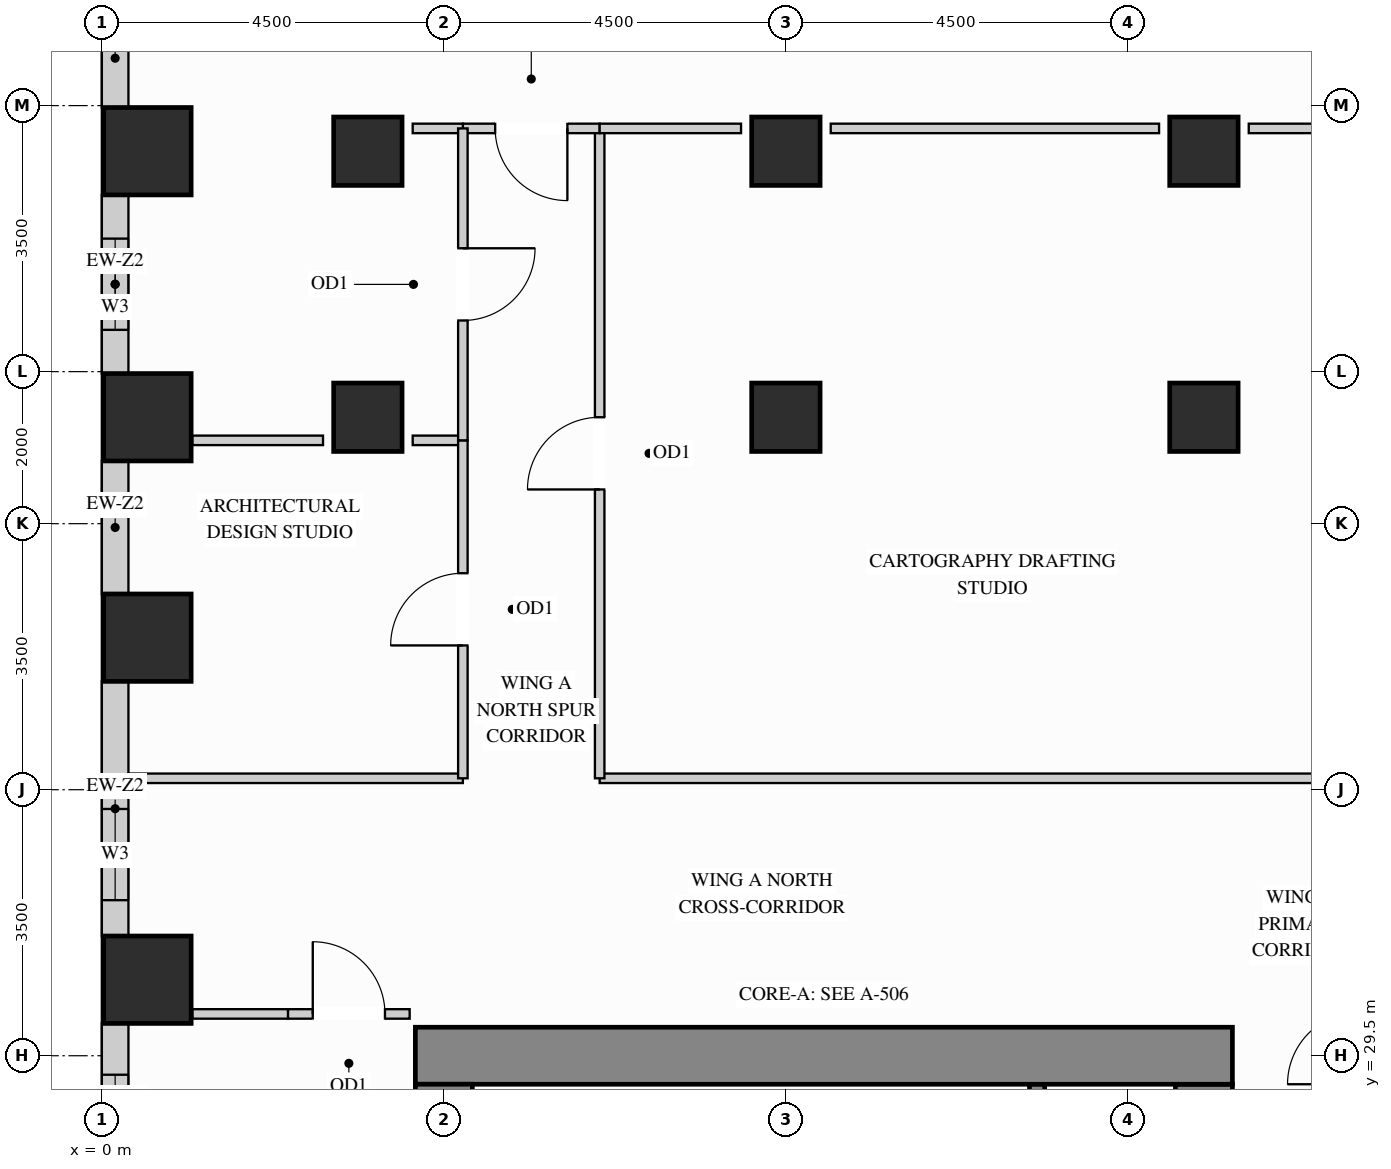
"""IFC4 building model, lengths in metres.
Left out: names, types, materials, properties, quantities, classifications, styles, units other than length and angle.
Written with IfcOpenShell. Run it as: python <this file> out.ifc"""

import sys

from ifc_helpers import new_model, si_unit, direction, frame, frame_2d, origin, origin_2d, place, context, subcontext, project, spatial, rectangle, extrude, source, transform, mapped, element, fill, save


model = new_model("IFC4")
c1 = context("Model", 3, precision=1e-05, world=origin(), true_north=direction((0.0, 1.0)))
c2 = subcontext(c1, "Body", "Model", "MODEL_VIEW")
j1 = project(units=[si_unit("LENGTHUNIT", "METRE"), si_unit("PLANEANGLEUNIT", "RADIAN")], contexts=[c1])
p1 = place(None, origin())
s1 = spatial("IfcSite", under=j1, at=p1, CompositionType="ELEMENT")
p2 = place(p1, origin())
s2 = spatial("IfcBuilding", under=s1, at=p2, CompositionType="ELEMENT")
p3 = place(p2, frame((0.0, 0.0, 84.6)))
s3 = spatial("IfcBuildingStorey", under=s2, at=p3, CompositionType="ELEMENT", Elevation=84.6)
m1 = source(origin(), c2, "Body", "SweptSolid", [
    extrude(rectangle(XDim=0.9, YDim=0.9, at=origin_2d()), origin(), (0.0, 0.0, 1.0), 3.38),
])
for number, where, z_axis, x_axis in (
    (1, (14.5, 37.9, 0.0), (0.0, 0.0, 1.0), (1.0, 0.0, 0.0)),
    (2, (14.5, 41.4, 0.0), (0.0, 0.0, 1.0), (1.0, 0.0, 0.0)),
    (3, (3.5, 37.9, 0.0), (0.0, 0.0, 1.0), (1.0, 0.0, 0.0)),
    (4, (3.5, 41.4, 0.0), (0.0, 0.0, 1.0), (1.0, 0.0, 0.0)),
    (5, (9.0, 37.9, 0.0), (0.0, 0.0, 1.0), (1.0, 0.0, 0.0)),
    (6, (9.0, 41.4, 0.0), (0.0, 0.0, 1.0), (1.0, 0.0, 0.0)),
):
    element("IfcColumn", number, at=place(p3, frame(where, z_axis=z_axis, x_axis=x_axis)), inside=s3, PredefinedType="COLUMN", context=c2, shape_type="MappedRepresentation", body=[
        mapped(m1, transform((0.0, 0.0, 0.0), x_axis=(1.0, 0.0, 0.0), y_axis=(0.0, 1.0, 0.0), z_axis=(0.0, 0.0, 1.0))),
    ])
m2 = source(origin(), c2, "Body", "SweptSolid", [
    extrude(rectangle(XDim=1.15, YDim=1.15, at=origin_2d()), origin(), (0.0, 0.0, 1.0), 3.38),
])
for number, where, z_axis, x_axis in (
    (7, (0.6, 30.5, 0.0), (0.0, 0.0, 1.0), (1.0, 0.0, 0.0)),
    (8, (0.6, 35.0, 0.0), (0.0, 0.0, 1.0), (1.0, 0.0, 0.0)),
    (9, (0.6, 37.9, 0.0), (0.0, 0.0, 1.0), (1.0, 0.0, 0.0)),
    (10, (0.6, 41.4, 0.0), (0.0, 0.0, 1.0), (1.0, 0.0, 0.0)),
):
    element("IfcColumn", number, at=place(p3, frame(where, z_axis=z_axis, x_axis=x_axis)), inside=s3, PredefinedType="COLUMN", context=c2, shape_type="MappedRepresentation", body=[
        mapped(m2, transform((0.0, 0.0, 0.0), x_axis=(1.0, 0.0, 0.0), y_axis=(0.0, 1.0, 0.0), z_axis=(0.0, 0.0, 1.0))),
    ])
m3 = source(origin(), c2, "Body", "SweptSolid", [
    extrude(rectangle(XDim=8.245, YDim=0.75, at=frame_2d((4.123, 0.0))), origin(), (0.0, 0.0, 1.0), 3.38),
])
p4 = place(p3, frame((14.5, 20.88, 0.0), z_axis=(0.0, 0.0, 1.0), x_axis=(0.0, 1.0, 0.0)))
e11 = element("IfcWall", 11, at=p4, inside=s3, PredefinedType="SHEAR", context=c2, shape_type="MappedRepresentation", body=[
    mapped(m3, transform((0.0, 0.0, 0.0), x_axis=(1.0, 0.0, 0.0), y_axis=(0.0, 1.0, 0.0), z_axis=(0.0, 0.0, 1.0))),
])
m4 = source(origin(), c2, "Body", "SweptSolid", [
    extrude(rectangle(XDim=10.75, YDim=0.75, at=frame_2d((5.375, 0.0))), origin(), (0.0, 0.0, 1.0), 3.38),
])
p5 = place(p3, frame((4.125, 29.5, 0.0), z_axis=(0.0, 0.0, 1.0), x_axis=(1.0, 0.0, 0.0)))
e12 = element("IfcWall", 12, at=p5, inside=s3, PredefinedType="SHEAR", context=c2, shape_type="MappedRepresentation", body=[
    mapped(m4, transform((0.0, 0.0, 0.0), x_axis=(1.0, 0.0, 0.0), y_axis=(0.0, 1.0, 0.0), z_axis=(0.0, 0.0, 1.0))),
])
m5 = source(origin(), c2, "Body", "SweptSolid", [
    extrude(rectangle(XDim=20.25, YDim=0.75, at=frame_2d((10.125, 0.0))), origin(), (0.0, 0.0, 1.0), 3.38),
])
p6 = place(p3, frame((4.5, 8.875, 0.0), z_axis=(0.0, 0.0, 1.0), x_axis=(0.0, 1.0, 0.0)))
e13 = element("IfcWall", 13, at=p6, inside=s3, PredefinedType="SHEAR", context=c2, shape_type="MappedRepresentation", body=[
    mapped(m5, transform((0.0, 0.0, 0.0), x_axis=(1.0, 0.0, 0.0), y_axis=(0.0, 1.0, 0.0), z_axis=(0.0, 0.0, 1.0))),
])
m6 = source(origin(), c2, "Body", "SweptSolid", [
    extrude(rectangle(XDim=1.179, YDim=0.35, at=frame_2d((0.59, 0.0))), origin(), (0.0, 0.0, 1.0), 3.365),
])
p7 = place(p3, frame((0.175, 43.152, 0.0), z_axis=(0.0, 0.0, 1.0), x_axis=(0.0, -1.0, 0.0)))
e14 = element("IfcWall", 14, at=p7, inside=s3, PredefinedType="SOLIDWALL", context=c2, shape_type="MappedRepresentation", body=[
    mapped(m6, transform((0.0, 0.0, 0.0), x_axis=(1.0, 0.0, 0.0), y_axis=(0.0, 1.0, 0.0), z_axis=(0.0, 0.0, 1.0))),
])
p8 = place(p3, frame((0.175, 40.827, 0.0), z_axis=(0.0, 0.0, 1.0), x_axis=(0.0, -1.0, 0.0)))
e15 = element("IfcWall", 15, at=p8, inside=s3, PredefinedType="SOLIDWALL", context=c2, shape_type="SweptSolid", body=[
    extrude(rectangle(XDim=2.354, YDim=0.35, at=frame_2d((1.177, 0.0))), origin(), (0.0, 0.0, 1.0), 3.365),
])
p9 = place(p8, frame((0.577, 0.0, 0.78)))
e16 = element("IfcOpeningElement", 16, at=p9, cuts=e15, PredefinedType="OPENING", context=c2, shape_type="SweptSolid", body=[
    extrude(rectangle(XDim=1.2, YDim=2.1, at=frame_2d((0.6, 1.05))), frame((0.0, 0.185, 0.0), z_axis=(0.0, -1.0, 0.0), x_axis=(1.0, 0.0, 0.0)), (0.0, 0.0, 1.0), 0.37),
])
m7 = source(origin(), c2, "Body", "SweptSolid", [
    extrude(rectangle(XDim=1.754, YDim=0.35, at=frame_2d((0.877, 0.0))), origin(), (0.0, 0.0, 1.0), 3.365),
])
p10 = place(p3, frame((0.175, 37.327, 0.0), z_axis=(0.0, 0.0, 1.0), x_axis=(0.0, -1.0, 0.0)))
e17 = element("IfcWall", 17, at=p10, inside=s3, PredefinedType="SOLIDWALL", context=c2, shape_type="MappedRepresentation", body=[
    mapped(m7, transform((0.0, 0.0, 0.0), x_axis=(1.0, 0.0, 0.0), y_axis=(0.0, 1.0, 0.0), z_axis=(0.0, 0.0, 1.0))),
])
p11 = place(p3, frame((0.175, 34.427, 0.0), z_axis=(0.0, 0.0, 1.0), x_axis=(0.0, -1.0, 0.0)))
e18 = element("IfcWall", 18, at=p11, inside=s3, PredefinedType="SOLIDWALL", context=c2, shape_type="SweptSolid", body=[
    extrude(rectangle(XDim=3.354, YDim=0.35, at=frame_2d((1.677, 0.0))), origin(), (0.0, 0.0, 1.0), 3.365),
])
p12 = place(p11, frame((1.68, 0.0, 0.78)))
e19 = element("IfcOpeningElement", 19, at=p12, cuts=e18, PredefinedType="OPENING", context=c2, shape_type="SweptSolid", body=[
    extrude(rectangle(XDim=1.2, YDim=2.1, at=frame_2d((0.6, 1.05))), frame((0.0, 0.185, 0.0), z_axis=(0.0, -1.0, 0.0), x_axis=(1.0, 0.0, 0.0)), (0.0, 0.0, 1.0), 0.37),
])
p13 = place(p3, frame((0.175, 29.927, 0.0), z_axis=(0.0, 0.0, 1.0), x_axis=(0.0, -1.0, 0.0)))
e20 = element("IfcWall", 20, at=p13, inside=s3, PredefinedType="SOLIDWALL", context=c2, shape_type="SweptSolid", body=[
    extrude(rectangle(XDim=2.554, YDim=0.35, at=frame_2d((1.277, 0.0))), origin(), (0.0, 0.0, 1.0), 3.365),
])
p14 = place(p13, frame((0.677, 0.0, 0.78)))
e21 = element("IfcOpeningElement", 21, at=p14, cuts=e20, PredefinedType="OPENING", context=c2, shape_type="SweptSolid", body=[
    extrude(rectangle(XDim=1.2, YDim=2.1, at=frame_2d((0.6, 1.05))), frame((0.0, 0.185, 0.0), z_axis=(0.0, -1.0, 0.0), x_axis=(1.0, 0.0, 0.0)), (0.0, 0.0, 1.0), 0.37),
])
m8 = source(origin(), c2, "Body", "SweptSolid", [
    extrude(rectangle(XDim=12.598, YDim=0.125, at=frame_2d((6.299, 0.0))), origin(), (0.0, 0.0, 1.0), 3.365),
])
p15 = place(p3, frame((6.55, 33.15, 0.0), z_axis=(0.0, 0.0, 1.0), x_axis=(1.0, 0.0, 0.0)))
e22 = element("IfcWall", 22, at=p15, inside=s3, PredefinedType="PARTITIONING", context=c2, shape_type="MappedRepresentation", body=[
    mapped(m8, transform((0.0, 0.0, 0.0), x_axis=(1.0, 0.0, 0.0), y_axis=(0.0, 1.0, 0.0), z_axis=(0.0, 0.0, 1.0))),
])
m9 = source(origin(), c2, "Body", "SweptSolid", [
    extrude(rectangle(XDim=4.398, YDim=0.125, at=frame_2d((2.199, 0.0))), origin(), (0.0, 0.0, 1.0), 3.365),
])
p16 = place(p3, frame((0.352, 33.15, 0.0), z_axis=(0.0, 0.0, 1.0), x_axis=(1.0, 0.0, 0.0)))
e23 = element("IfcWall", 23, at=p16, inside=s3, PredefinedType="PARTITIONING", context=c2, shape_type="MappedRepresentation", body=[
    mapped(m9, transform((0.0, 0.0, 0.0), x_axis=(1.0, 0.0, 0.0), y_axis=(0.0, 1.0, 0.0), z_axis=(0.0, 0.0, 1.0))),
])
m10 = source(origin(), c2, "Body", "SweptSolid", [
    extrude(rectangle(XDim=1.72, YDim=0.125, at=frame_2d((0.86, 0.0))), origin(), (0.0, 0.0, 1.0), 3.365),
])
p17 = place(p3, frame((1.19, 37.596, 0.0), z_axis=(0.0, 0.0, 1.0), x_axis=(1.0, 0.0, 0.0)))
e24 = element("IfcWall", 24, at=p17, inside=s3, PredefinedType="PARTITIONING", context=c2, shape_type="MappedRepresentation", body=[
    mapped(m10, transform((0.0, 0.0, 0.0), x_axis=(1.0, 0.0, 0.0), y_axis=(0.0, 1.0, 0.0), z_axis=(0.0, 0.0, 1.0))),
])
m11 = source(origin(), c2, "Body", "SweptSolid", [
    extrude(rectangle(XDim=0.66, YDim=0.125, at=frame_2d((0.33, 0.0))), origin(), (0.0, 0.0, 1.0), 3.365),
])
p18 = place(p3, frame((4.09, 37.596, 0.0), z_axis=(0.0, 0.0, 1.0), x_axis=(1.0, 0.0, 0.0)))
e25 = element("IfcWall", 25, at=p18, inside=s3, PredefinedType="PARTITIONING", context=c2, shape_type="MappedRepresentation", body=[
    mapped(m11, transform((0.0, 0.0, 0.0), x_axis=(1.0, 0.0, 0.0), y_axis=(0.0, 1.0, 0.0), z_axis=(0.0, 0.0, 1.0))),
])
m12 = source(origin(), c2, "Body", "SweptSolid", [
    extrude(rectangle(XDim=1.26, YDim=0.125, at=frame_2d((0.63, 0.0))), origin(), (0.0, 0.0, 1.0), 3.365),
])
p19 = place(p3, frame((1.19, 30.05, 0.0), z_axis=(0.0, 0.0, 1.0), x_axis=(1.0, 0.0, 0.0)))
e26 = element("IfcWall", 26, at=p19, inside=s3, PredefinedType="PARTITIONING", context=c2, shape_type="MappedRepresentation", body=[
    mapped(m12, transform((0.0, 0.0, 0.0), x_axis=(1.0, 0.0, 0.0), y_axis=(0.0, 1.0, 0.0), z_axis=(0.0, 0.0, 1.0))),
])
p20 = place(p3, frame((2.45, 30.05, 0.0), z_axis=(0.0, 0.0, 1.0), x_axis=(1.0, 0.0, 0.0)))
e27 = element("IfcWall", 27, at=p20, inside=s3, PredefinedType="PARTITIONING", context=c2, shape_type="SweptSolid", body=[
    extrude(rectangle(XDim=1.6, YDim=0.125, at=frame_2d((0.8, 0.0))), origin(), (0.0, 0.0, 1.0), 3.365),
])
p21 = place(p20, frame((0.325, 0.0, 0.0)))
e28 = element("IfcOpeningElement", 28, at=p21, cuts=e27, PredefinedType="OPENING", context=c2, shape_type="SweptSolid", body=[
    extrude(rectangle(XDim=0.95, YDim=2.15, at=frame_2d((0.475, 1.075))), frame((0.0, 0.073, 0.0), z_axis=(0.0, -1.0, 0.0), x_axis=(1.0, 0.0, 0.0)), (0.0, 0.0, 1.0), 0.145),
])
p22 = place(p3, frame((6.55, 33.15, 0.0), z_axis=(0.0, 0.0, 1.0), x_axis=(0.0, 1.0, 0.0)))
e29 = element("IfcWall", 29, at=p22, inside=s3, PredefinedType="PARTITIONING", context=c2, shape_type="SweptSolid", body=[
    extrude(rectangle(XDim=8.55, YDim=0.125, at=frame_2d((4.275, 0.0))), origin(), (0.0, 0.0, 1.0), 3.365),
])
p23 = place(p22, frame((3.8, 0.0, 0.0)))
e30 = element("IfcOpeningElement", 30, at=p23, cuts=e29, PredefinedType="OPENING", context=c2, shape_type="SweptSolid", body=[
    extrude(rectangle(XDim=0.95, YDim=2.15, at=frame_2d((0.475, 1.075))), frame((0.0, 0.073, 0.0), z_axis=(0.0, -1.0, 0.0), x_axis=(1.0, 0.0, 0.0)), (0.0, 0.0, 1.0), 0.145),
])
p24 = place(p3, frame((4.75, 41.7, 0.0), z_axis=(0.0, 0.0, 1.0), x_axis=(1.0, 0.0, 0.0)))
e31 = element("IfcWall", 31, at=p24, inside=s3, PredefinedType="PARTITIONING", context=c2, shape_type="SweptSolid", body=[
    extrude(rectangle(XDim=1.8, YDim=0.125, at=frame_2d((0.9, 0.0))), origin(), (0.0, 0.0, 1.0), 3.365),
])
p25 = place(p24, frame((0.425, 0.0, 0.0)))
e32 = element("IfcOpeningElement", 32, at=p25, cuts=e31, PredefinedType="OPENING", context=c2, shape_type="SweptSolid", body=[
    extrude(rectangle(XDim=0.95, YDim=2.15, at=frame_2d((0.475, 1.075))), frame((0.0, 0.073, 0.0), z_axis=(0.0, -1.0, 0.0), x_axis=(1.0, 0.0, 0.0)), (0.0, 0.0, 1.0), 0.145),
])
m13 = source(origin(), c2, "Body", "SweptSolid", [
    extrude(rectangle(XDim=1.86, YDim=0.125, at=frame_2d((0.93, 0.0))), origin(), (0.0, 0.0, 1.0), 3.365),
])
p26 = place(p3, frame((6.55, 41.7, 0.0), z_axis=(0.0, 0.0, 1.0), x_axis=(1.0, 0.0, 0.0)))
e33 = element("IfcWall", 33, at=p26, inside=s3, PredefinedType="PARTITIONING", context=c2, shape_type="MappedRepresentation", body=[
    mapped(m13, transform((0.0, 0.0, 0.0), x_axis=(1.0, 0.0, 0.0), y_axis=(0.0, 1.0, 0.0), z_axis=(0.0, 0.0, 1.0))),
])
m14 = source(origin(), c2, "Body", "SweptSolid", [
    extrude(rectangle(XDim=4.32, YDim=0.125, at=frame_2d((2.16, 0.0))), origin(), (0.0, 0.0, 1.0), 3.365),
])
p27 = place(p3, frame((9.59, 41.7, 0.0), z_axis=(0.0, 0.0, 1.0), x_axis=(1.0, 0.0, 0.0)))
e34 = element("IfcWall", 34, at=p27, inside=s3, PredefinedType="PARTITIONING", context=c2, shape_type="MappedRepresentation", body=[
    mapped(m14, transform((0.0, 0.0, 0.0), x_axis=(1.0, 0.0, 0.0), y_axis=(0.0, 1.0, 0.0), z_axis=(0.0, 0.0, 1.0))),
])
m15 = source(origin(), c2, "Body", "SweptSolid", [
    extrude(rectangle(XDim=1.81, YDim=0.125, at=frame_2d((0.905, 0.0))), origin(), (0.0, 0.0, 1.0), 3.365),
])
p28 = place(p3, frame((15.09, 41.7, 0.0), z_axis=(0.0, 0.0, 1.0), x_axis=(1.0, 0.0, 0.0)))
e35 = element("IfcWall", 35, at=p28, inside=s3, PredefinedType="PARTITIONING", context=c2, shape_type="MappedRepresentation", body=[
    mapped(m15, transform((0.0, 0.0, 0.0), x_axis=(1.0, 0.0, 0.0), y_axis=(0.0, 1.0, 0.0), z_axis=(0.0, 0.0, 1.0))),
])
p29 = place(p3, frame((4.09, 41.7, 0.0), z_axis=(0.0, 0.0, 1.0), x_axis=(1.0, 0.0, 0.0)))
e36 = element("IfcWall", 36, at=p29, inside=s3, PredefinedType="PARTITIONING", context=c2, shape_type="MappedRepresentation", body=[
    mapped(m11, transform((0.0, 0.0, 0.0), x_axis=(1.0, 0.0, 0.0), y_axis=(0.0, 1.0, 0.0), z_axis=(0.0, 0.0, 1.0))),
])
p30 = place(p3, frame((4.75, 33.15, 0.0), z_axis=(0.0, 0.0, 1.0), x_axis=(0.0, 1.0, 0.0)))
e37 = element("IfcWall", 37, at=p30, inside=s3, PredefinedType="PARTITIONING", context=c2, shape_type="SweptSolid", body=[
    extrude(rectangle(XDim=4.446, YDim=0.125, at=frame_2d((2.223, 0.0))), origin(), (0.0, 0.0, 1.0), 3.365),
])
p31 = place(p30, frame((1.748, 0.0, 0.0)))
e38 = element("IfcOpeningElement", 38, at=p31, cuts=e37, PredefinedType="OPENING", context=c2, shape_type="SweptSolid", body=[
    extrude(rectangle(XDim=0.95, YDim=2.15, at=frame_2d((0.475, 1.075))), frame((0.0, 0.073, 0.0), z_axis=(0.0, -1.0, 0.0), x_axis=(1.0, 0.0, 0.0)), (0.0, 0.0, 1.0), 0.145),
])
p32 = place(p3, frame((4.75, 37.596, 0.0), z_axis=(0.0, 0.0, 1.0), x_axis=(0.0, 1.0, 0.0)))
e39 = element("IfcWall", 39, at=p32, inside=s3, PredefinedType="PARTITIONING", context=c2, shape_type="SweptSolid", body=[
    extrude(rectangle(XDim=4.104, YDim=0.125, at=frame_2d((2.052, 0.0))), origin(), (0.0, 0.0, 1.0), 3.365),
])
p33 = place(p32, frame((1.577, 0.0, 0.0)))
e40 = element("IfcOpeningElement", 40, at=p33, cuts=e39, PredefinedType="OPENING", context=c2, shape_type="SweptSolid", body=[
    extrude(rectangle(XDim=0.95, YDim=2.15, at=frame_2d((0.475, 1.075))), frame((0.0, 0.073, 0.0), z_axis=(0.0, -1.0, 0.0), x_axis=(1.0, 0.0, 0.0)), (0.0, 0.0, 1.0), 0.145),
])
m16 = source(origin(), c2, "Body", "SweptSolid", [
    extrude(rectangle(XDim=3.678, YDim=0.2, at=frame_2d((1.839, 0.0))), origin(), (0.0, 0.0, 1.0), 3.38),
])
p34 = place(p3, frame((12.305, 25.445, 0.0), z_axis=(0.0, 0.0, 1.0), x_axis=(0.0, 1.0, 0.0)))
e41 = element("IfcWall", 41, at=p34, inside=s3, PredefinedType="SHEAR", context=c2, shape_type="MappedRepresentation", body=[
    mapped(m16, transform((0.0, 0.0, 0.0), x_axis=(1.0, 0.0, 0.0), y_axis=(0.0, 1.0, 0.0), z_axis=(0.0, 0.0, 1.0))),
])
m17 = source(origin(), c2, "Body", "SweptSolid", [
    extrude(rectangle(XDim=0.95, YDim=2.15, at=frame_2d((0.475, 1.075))), frame((0.0, 0.025, 0.0), z_axis=(0.0, -1.0, 0.0), x_axis=(1.0, 0.0, 0.0)), (0.0, 0.0, 1.0), 0.05),
])
p35 = place(p23, origin())
e42 = element("IfcDoor", 42, at=p35, inside=s3, OperationType="SINGLE_SWING_LEFT", PredefinedType="DOOR", context=c2, shape_type="MappedRepresentation", body=[
    mapped(m17, transform((0.0, 0.0, 0.0), x_axis=(1.0, 0.0, 0.0), y_axis=(0.0, 1.0, 0.0), z_axis=(0.0, 0.0, 1.0))),
])
fill(e30, e42)
p36 = place(p25, origin())
e43 = element("IfcDoor", 43, at=p36, inside=s3, OperationType="SINGLE_SWING_RIGHT", PredefinedType="DOOR", context=c2, shape_type="MappedRepresentation", body=[
    mapped(m17, transform((0.0, 0.0, 0.0), x_axis=(1.0, 0.0, 0.0), y_axis=(0.0, 1.0, 0.0), z_axis=(0.0, 0.0, 1.0))),
])
fill(e32, e43)
p37 = place(p31, origin())
e44 = element("IfcDoor", 44, at=p37, inside=s3, OperationType="SINGLE_SWING_LEFT", PredefinedType="DOOR", context=c2, shape_type="MappedRepresentation", body=[
    mapped(m17, transform((0.0, 0.0, 0.0), x_axis=(1.0, 0.0, 0.0), y_axis=(0.0, 1.0, 0.0), z_axis=(0.0, 0.0, 1.0))),
])
fill(e38, e44)
p38 = place(p33, origin())
e45 = element("IfcDoor", 45, at=p38, inside=s3, OperationType="SINGLE_SWING_RIGHT", PredefinedType="DOOR", context=c2, shape_type="MappedRepresentation", body=[
    mapped(m17, transform((0.0, 0.0, 0.0), x_axis=(1.0, 0.0, 0.0), y_axis=(0.0, 1.0, 0.0), z_axis=(0.0, 0.0, 1.0))),
])
fill(e40, e45)
p39 = place(p21, origin())
e46 = element("IfcDoor", 46, at=p39, inside=s3, OperationType="SINGLE_SWING_LEFT", PredefinedType="DOOR", context=c2, shape_type="MappedRepresentation", body=[
    mapped(m17, transform((0.0, 0.0, 0.0), x_axis=(1.0, 0.0, 0.0), y_axis=(0.0, 1.0, 0.0), z_axis=(0.0, 0.0, 1.0))),
])
fill(e28, e46)
m18 = source(origin(), c2, "Body", "SweptSolid", [
    extrude(rectangle(XDim=1.2, YDim=2.1, at=frame_2d((0.6, 1.05))), frame((0.0, 0.03, 0.0), z_axis=(0.0, -1.0, 0.0), x_axis=(1.0, 0.0, 0.0)), (0.0, 0.0, 1.0), 0.06),
])
p40 = place(p9, origin())
e47 = element("IfcWindow", 47, at=p40, inside=s3, PartitioningType="SINGLE_PANEL", PredefinedType="WINDOW", context=c2, shape_type="MappedRepresentation", body=[
    mapped(m18, transform((0.0, 0.0, 0.0), x_axis=(1.0, 0.0, 0.0), y_axis=(0.0, 1.0, 0.0), z_axis=(0.0, 0.0, 1.0))),
])
fill(e16, e47)
p41 = place(p12, origin())
e48 = element("IfcWindow", 48, at=p41, inside=s3, PartitioningType="SINGLE_PANEL", PredefinedType="WINDOW", context=c2, shape_type="MappedRepresentation", body=[
    mapped(m18, transform((0.0, 0.0, 0.0), x_axis=(1.0, 0.0, 0.0), y_axis=(0.0, 1.0, 0.0), z_axis=(0.0, 0.0, 1.0))),
])
fill(e19, e48)
p42 = place(p14, origin())
e49 = element("IfcWindow", 49, at=p42, inside=s3, PartitioningType="SINGLE_PANEL", PredefinedType="WINDOW", context=c2, shape_type="MappedRepresentation", body=[
    mapped(m18, transform((0.0, 0.0, 0.0), x_axis=(1.0, 0.0, 0.0), y_axis=(0.0, 1.0, 0.0), z_axis=(0.0, 0.0, 1.0))),
])
fill(e21, e49)
save(model, sys.argv[1])
